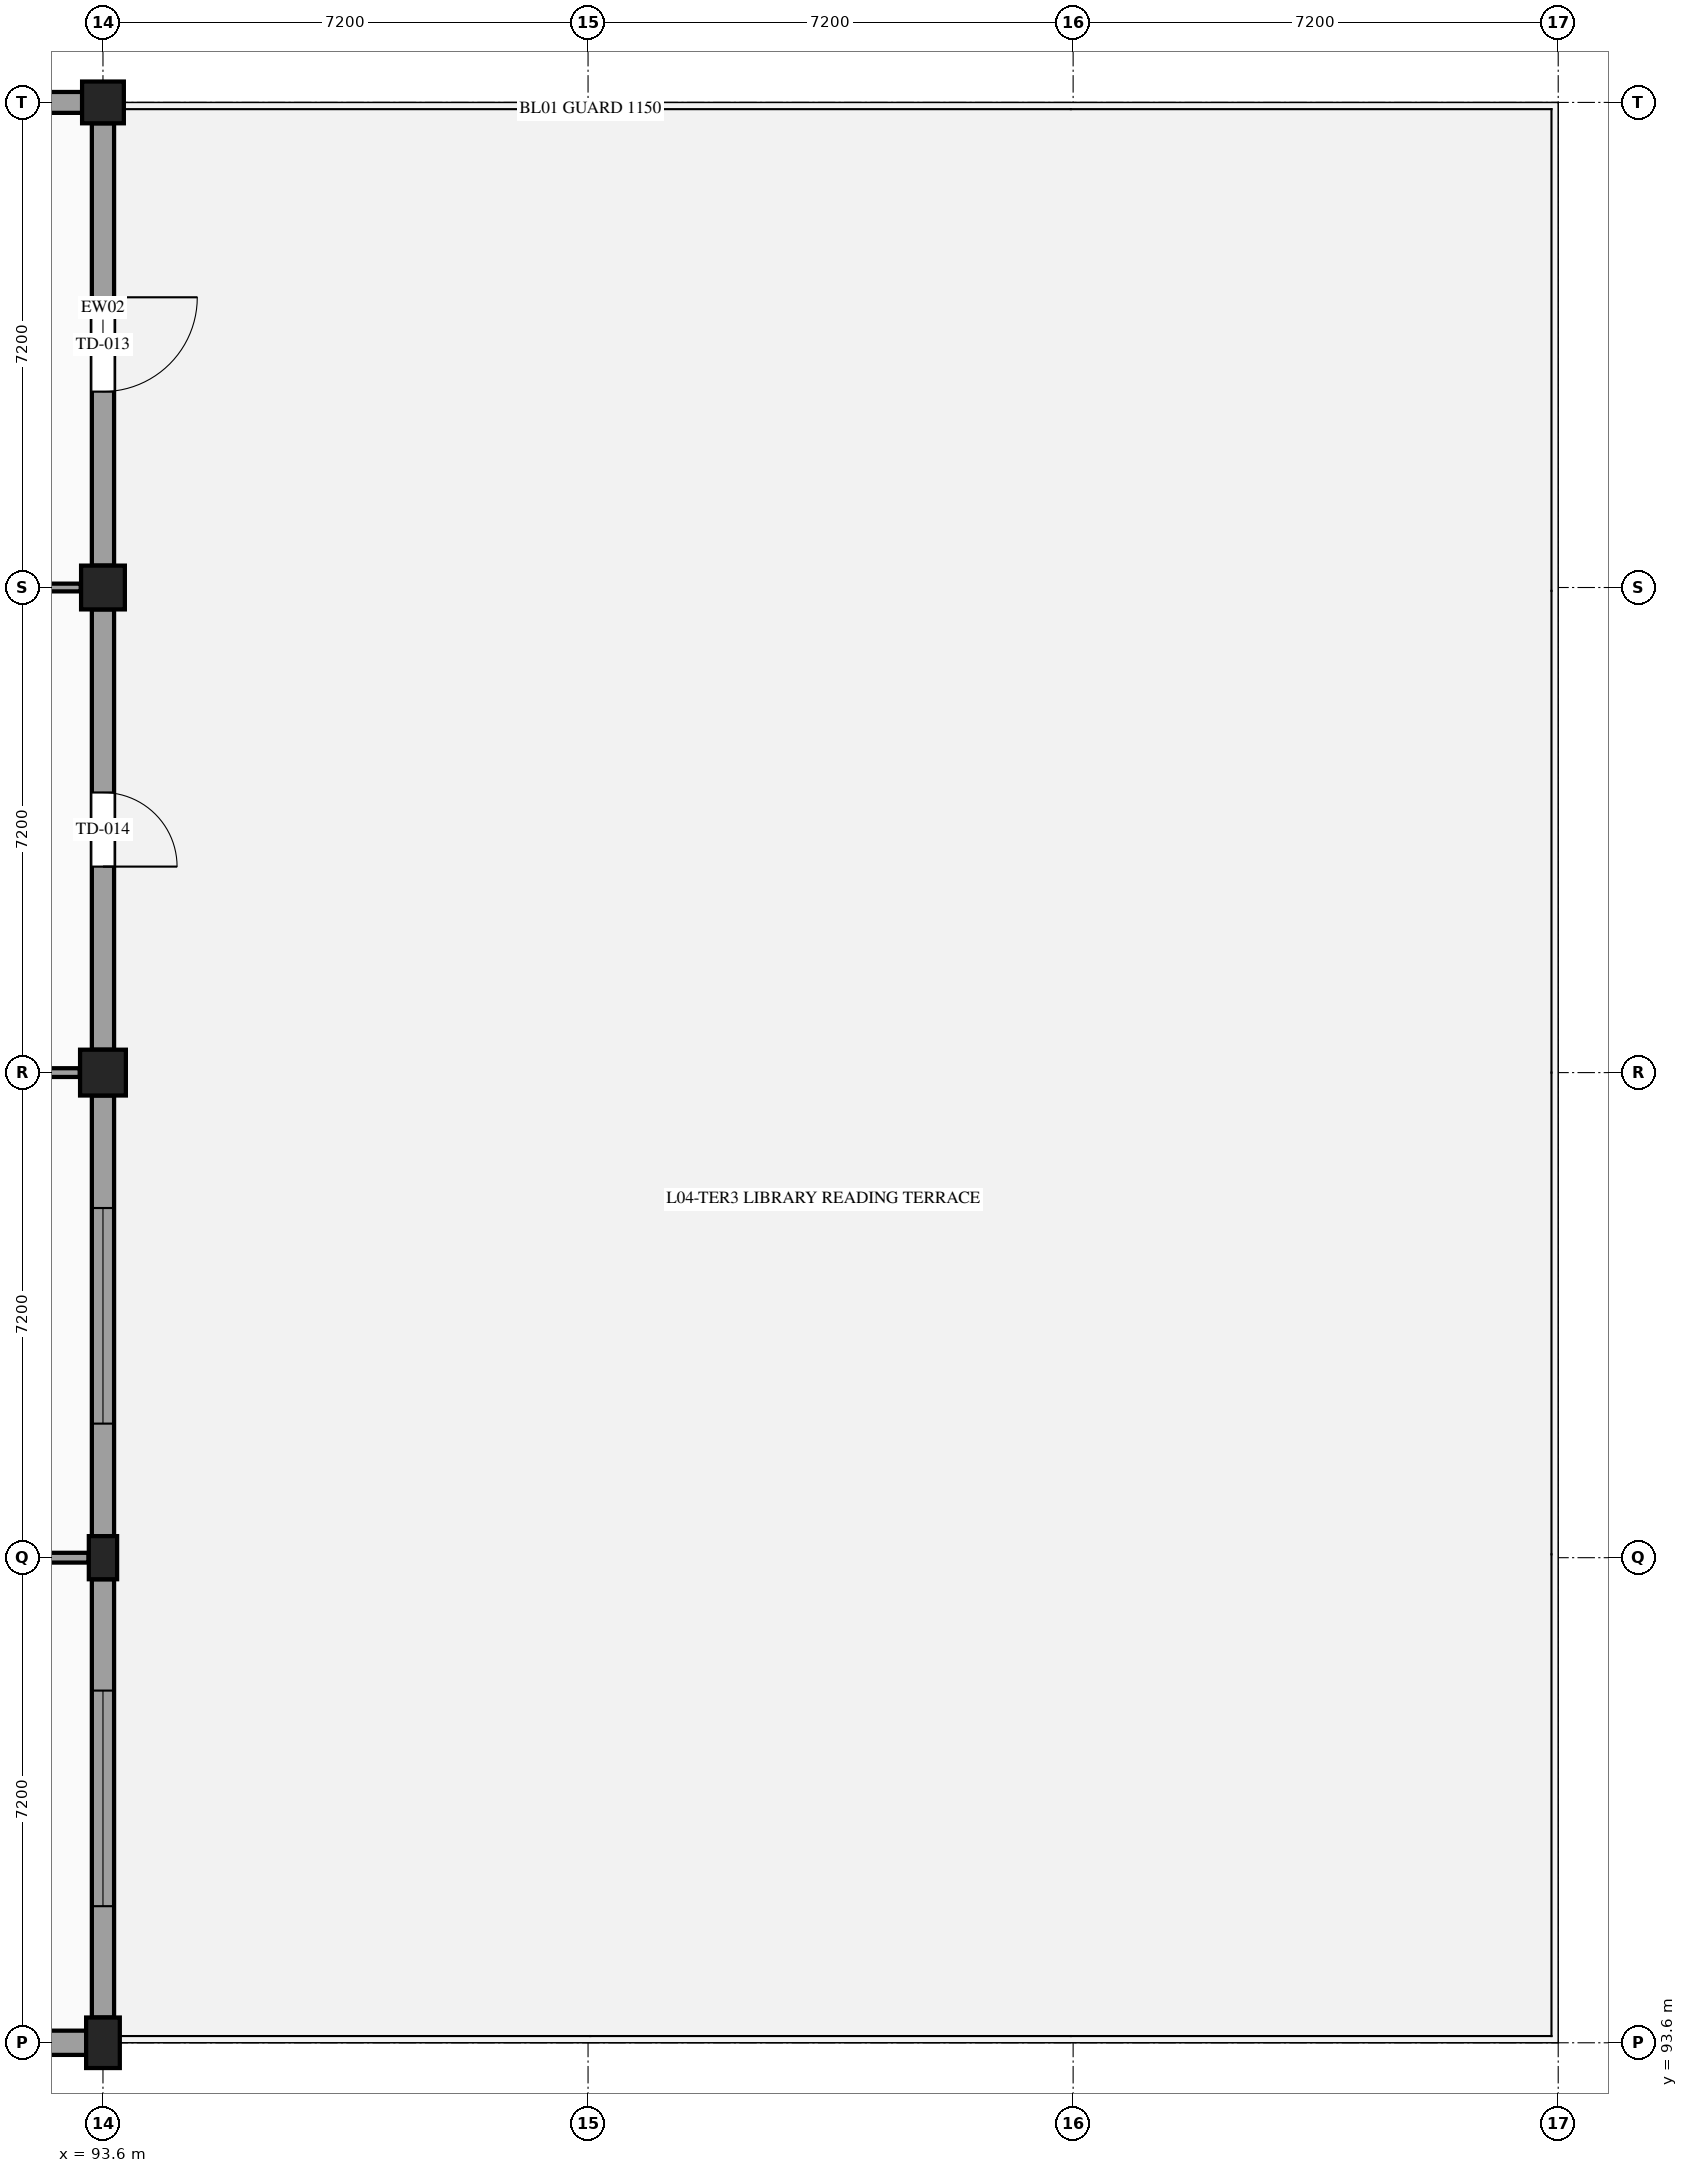
"""IFC4 building model, lengths in metres.
Left out: names, types, materials, properties, quantities, classifications, styles, units other than length and angle.
Written with IfcOpenShell. Run it as: python <this file> out.ifc"""

import sys

from ifc_helpers import new_model, si_unit, direction, frame, frame_2d, origin, origin_2d, place, context, subcontext, project, spatial, rectangle, extrude, element, fill, save


model = new_model("IFC4")
c1 = context("Model", 3, precision=1e-05, world=origin(), true_north=direction((0.0, 1.0)))
c2 = subcontext(c1, "Body", "Model", "MODEL_VIEW")
j1 = project(units=[si_unit("LENGTHUNIT", "METRE"), si_unit("PLANEANGLEUNIT", "RADIAN")], contexts=[c1])
p1 = place(None, origin())
s1 = spatial("IfcSite", under=j1, at=p1, CompositionType="ELEMENT")
p2 = place(p1, origin())
s2 = spatial("IfcBuilding", under=s1, at=p2, CompositionType="ELEMENT")
p3 = place(p2, frame((0.0, 0.0, 18.6)))
s3 = spatial("IfcBuildingStorey", under=s2, at=p3, CompositionType="ELEMENT", Elevation=18.6)
p4 = place(p3, frame((93.6, 93.6, 0.0), z_axis=(0.0, 0.0, 1.0), x_axis=(1.0, 0.0, 0.0)))
e1 = element("IfcColumn", 1, at=p4, inside=s3, PredefinedType="COLUMN", context=c2, shape_type="SweptSolid", body=[
    extrude(rectangle(XDim=0.5, YDim=0.75, at=origin_2d()), origin(), (0.0, 0.0, 1.0), 4.2),
])
p5 = place(p3, frame((93.6, 100.8, 0.0), z_axis=(0.0, 0.0, 1.0), x_axis=(1.0, 0.0, 0.0)))
e2 = element("IfcColumn", 2, at=p5, inside=s3, PredefinedType="PILASTER", context=c2, shape_type="SweptSolid", body=[
    extrude(rectangle(XDim=0.42, YDim=0.64, at=origin_2d()), origin(), (0.0, 0.0, 1.0), 4.2),
])
p6 = place(p3, frame((93.6, 108.0, 0.0), z_axis=(0.0, 0.0, 1.0), x_axis=(1.0, 0.0, 0.0)))
e3 = element("IfcColumn", 3, at=p6, inside=s3, PredefinedType="COLUMN", context=c2, shape_type="SweptSolid", body=[
    extrude(rectangle(XDim=0.68, YDim=0.68, at=origin_2d()), origin(), (0.0, 0.0, 1.0), 4.2),
])
p7 = place(p3, frame((93.6, 115.2, 0.0), z_axis=(0.0, 0.0, 1.0), x_axis=(1.0, 0.0, 0.0)))
e4 = element("IfcColumn", 4, at=p7, inside=s3, PredefinedType="COLUMN", context=c2, shape_type="SweptSolid", body=[
    extrude(rectangle(XDim=0.65, YDim=0.65, at=origin_2d()), origin(), (0.0, 0.0, 1.0), 4.2),
])
p8 = place(p3, frame((93.6, 122.4, 0.0), z_axis=(0.0, 0.0, 1.0), x_axis=(1.0, 0.0, 0.0)))
e5 = element("IfcColumn", 5, at=p8, inside=s3, PredefinedType="COLUMN", context=c2, shape_type="SweptSolid", body=[
    extrude(rectangle(XDim=0.62, YDim=0.62, at=origin_2d()), origin(), (0.0, 0.0, 1.0), 4.2),
])
p9 = place(p3, frame((86.61, 122.4, 0.0), z_axis=(0.0, 0.0, 1.0), x_axis=(1.0, 0.0, 0.0)))
e6 = element("IfcWall", 6, at=p9, inside=s3, PredefinedType="STANDARD", context=c2, shape_type="SweptSolid", body=[
    extrude(rectangle(XDim=6.68, YDim=0.31, at=frame_2d((3.34, 0.0))), origin(), (0.0, 0.0, 1.0), 3.18),
])
p10 = place(p9, frame((1.34, 0.0, 0.98)))
e7 = element("IfcOpeningElement", 7, at=p10, cuts=e6, PredefinedType="OPENING", context=c2, shape_type="SweptSolid", body=[
    extrude(rectangle(XDim=4.0, YDim=1.55, at=frame_2d((2.0, 0.775))), frame((0.0, 0.165, 0.0), z_axis=(0.0, -1.0, 0.0), x_axis=(1.0, 0.0, 0.0)), (0.0, 0.0, 1.0), 0.33),
])
p11 = place(p3, frame((93.6, 122.09, 0.0), z_axis=(0.0, 0.0, 1.0), x_axis=(0.0, -1.0, 0.0)))
e8 = element("IfcWall", 8, at=p11, inside=s3, PredefinedType="STANDARD", context=c2, shape_type="SweptSolid", body=[
    extrude(rectangle(XDim=6.565, YDim=0.33, at=frame_2d((3.283, 0.0))), origin(), (0.0, 0.0, 1.0), 3.13),
])
p12 = place(p11, frame((2.583, 0.0, 0.0)))
e9 = element("IfcOpeningElement", 9, at=p12, cuts=e8, PredefinedType="OPENING", context=c2, shape_type="SweptSolid", body=[
    extrude(rectangle(XDim=1.4, YDim=2.25, at=frame_2d((0.7, 1.125))), frame((0.0, 0.175, 0.0), z_axis=(0.0, -1.0, 0.0), x_axis=(1.0, 0.0, 0.0)), (0.0, 0.0, 1.0), 0.35),
])
p13 = place(p3, frame((93.6, 114.875, 0.0), z_axis=(0.0, 0.0, 1.0), x_axis=(0.0, -1.0, 0.0)))
e10 = element("IfcWall", 10, at=p13, inside=s3, PredefinedType="STANDARD", context=c2, shape_type="SweptSolid", body=[
    extrude(rectangle(XDim=6.535, YDim=0.33, at=frame_2d((3.268, 0.0))), origin(), (0.0, 0.0, 1.0), 3.13),
])
p14 = place(p13, frame((2.718, 0.0, 0.0)))
e11 = element("IfcOpeningElement", 11, at=p14, cuts=e10, PredefinedType="OPENING", context=c2, shape_type="SweptSolid", body=[
    extrude(rectangle(XDim=1.1, YDim=2.2, at=frame_2d((0.55, 1.1))), frame((0.0, 0.175, 0.0), z_axis=(0.0, -1.0, 0.0), x_axis=(1.0, 0.0, 0.0)), (0.0, 0.0, 1.0), 0.35),
])
p15 = place(p3, frame((93.6, 107.66, 0.0), z_axis=(0.0, 0.0, 1.0), x_axis=(0.0, -1.0, 0.0)))
e12 = element("IfcWall", 12, at=p15, inside=s3, PredefinedType="STANDARD", context=c2, shape_type="SweptSolid", body=[
    extrude(rectangle(XDim=6.54, YDim=0.33, at=frame_2d((3.27, 0.0))), origin(), (0.0, 0.0, 1.0), 3.13),
])
p16 = place(p15, frame((1.67, 0.0, 0.95)))
e13 = element("IfcOpeningElement", 13, at=p16, cuts=e12, PredefinedType="OPENING", context=c2, shape_type="SweptSolid", body=[
    extrude(rectangle(XDim=3.2, YDim=1.45, at=frame_2d((1.6, 0.725))), frame((0.0, 0.175, 0.0), z_axis=(0.0, -1.0, 0.0), x_axis=(1.0, 0.0, 0.0)), (0.0, 0.0, 1.0), 0.35),
])
p17 = place(p3, frame((93.6, 100.48, 0.0), z_axis=(0.0, 0.0, 1.0), x_axis=(0.0, -1.0, 0.0)))
e14 = element("IfcWall", 14, at=p17, inside=s3, PredefinedType="STANDARD", context=c2, shape_type="SweptSolid", body=[
    extrude(rectangle(XDim=6.505, YDim=0.33, at=frame_2d((3.252, 0.0))), origin(), (0.0, 0.0, 1.0), 3.13),
])
p18 = place(p17, frame((1.653, 0.0, 0.95)))
e15 = element("IfcOpeningElement", 15, at=p18, cuts=e14, PredefinedType="OPENING", context=c2, shape_type="SweptSolid", body=[
    extrude(rectangle(XDim=3.2, YDim=1.45, at=frame_2d((1.6, 0.725))), frame((0.0, 0.175, 0.0), z_axis=(0.0, -1.0, 0.0), x_axis=(1.0, 0.0, 0.0)), (0.0, 0.0, 1.0), 0.35),
])
p19 = place(p3, frame((93.35, 93.6, 0.0), z_axis=(0.0, 0.0, 1.0), x_axis=(-1.0, 0.0, 0.0)))
e16 = element("IfcWall", 16, at=p19, inside=s3, PredefinedType="STANDARD", context=c2, shape_type="SweptSolid", body=[
    extrude(rectangle(XDim=6.625, YDim=0.36, at=frame_2d((3.312, 0.0))), origin(), (0.0, 0.0, 1.0), 3.18),
])
p20 = place(p19, frame((1.312, 0.0, 1.15)))
e17 = element("IfcOpeningElement", 17, at=p20, cuts=e16, PredefinedType="OPENING", context=c2, shape_type="SweptSolid", body=[
    extrude(rectangle(XDim=1.35, YDim=1.1, at=frame_2d((0.675, 0.55))), frame((0.0, 0.19, 0.0), z_axis=(0.0, -1.0, 0.0), x_axis=(1.0, 0.0, 0.0)), (0.0, 0.0, 1.0), 0.38),
])
p21 = place(p19, frame((3.962, 0.0, 1.15)))
e18 = element("IfcOpeningElement", 18, at=p21, cuts=e16, PredefinedType="OPENING", context=c2, shape_type="SweptSolid", body=[
    extrude(rectangle(XDim=1.35, YDim=1.1, at=frame_2d((0.675, 0.55))), frame((0.0, 0.19, 0.0), z_axis=(0.0, -1.0, 0.0), x_axis=(1.0, 0.0, 0.0)), (0.0, 0.0, 1.0), 0.38),
])
p22 = place(p3, frame((86.715, 100.8, 0.0), z_axis=(0.0, 0.0, 1.0), x_axis=(1.0, 0.0, 0.0)))
e19 = element("IfcWall", 19, at=p22, inside=s3, PredefinedType="PARTITIONING", context=c2, shape_type="SweptSolid", body=[
    extrude(rectangle(XDim=6.67, YDim=0.145, at=frame_2d((3.335, 0.0))), origin(), (0.0, 0.0, 1.0), 3.275),
])
p23 = place(p3, frame((86.705, 108.0, 0.0), z_axis=(0.0, 0.0, 1.0), x_axis=(1.0, 0.0, 0.0)))
e20 = element("IfcWall", 20, at=p23, inside=s3, PredefinedType="PARTITIONING", context=c2, shape_type="SweptSolid", body=[
    extrude(rectangle(XDim=6.55, YDim=0.13, at=frame_2d((3.275, 0.0))), origin(), (0.0, 0.0, 1.0), 3.275),
])
p24 = place(p3, frame((86.655, 115.2, 0.0), z_axis=(0.0, 0.0, 1.0), x_axis=(1.0, 0.0, 0.0)))
e21 = element("IfcWall", 21, at=p24, inside=s3, PredefinedType="PARTITIONING", context=c2, shape_type="SweptSolid", body=[
    extrude(rectangle(XDim=6.615, YDim=0.115, at=frame_2d((3.308, 0.0))), origin(), (0.0, 0.0, 1.0), 3.275),
])
p25 = place(p12, origin())
e22 = element("IfcDoor", 22, at=p25, inside=s3, OperationType="SINGLE_SWING_LEFT", PredefinedType="DOOR", context=c2, shape_type="SweptSolid", body=[
    extrude(rectangle(XDim=1.4, YDim=2.25, at=frame_2d((0.7, 1.125))), frame((0.0, 0.025, 0.0), z_axis=(0.0, -1.0, 0.0), x_axis=(1.0, 0.0, 0.0)), (0.0, 0.0, 1.0), 0.05),
])
fill(e9, e22)
p26 = place(p14, origin())
e23 = element("IfcDoor", 23, at=p26, inside=s3, OperationType="SINGLE_SWING_RIGHT", PredefinedType="DOOR", context=c2, shape_type="SweptSolid", body=[
    extrude(rectangle(XDim=1.1, YDim=2.2, at=frame_2d((0.55, 1.1))), frame((0.0, 0.025, 0.0), z_axis=(0.0, -1.0, 0.0), x_axis=(1.0, 0.0, 0.0)), (0.0, 0.0, 1.0), 0.05),
])
fill(e11, e23)
p27 = place(p16, origin())
e24 = element("IfcWindow", 24, at=p27, inside=s3, PartitioningType="SINGLE_PANEL", PredefinedType="WINDOW", context=c2, shape_type="SweptSolid", body=[
    extrude(rectangle(XDim=3.2, YDim=1.45, at=frame_2d((1.6, 0.725))), frame((0.0, 0.03, 0.0), z_axis=(0.0, -1.0, 0.0), x_axis=(1.0, 0.0, 0.0)), (0.0, 0.0, 1.0), 0.06),
])
fill(e13, e24)
p28 = place(p18, origin())
e25 = element("IfcWindow", 25, at=p28, inside=s3, PartitioningType="SINGLE_PANEL", PredefinedType="WINDOW", context=c2, shape_type="SweptSolid", body=[
    extrude(rectangle(XDim=3.2, YDim=1.45, at=frame_2d((1.6, 0.725))), frame((0.0, 0.03, 0.0), z_axis=(0.0, -1.0, 0.0), x_axis=(1.0, 0.0, 0.0)), (0.0, 0.0, 1.0), 0.06),
])
fill(e15, e25)
save(model, sys.argv[1])
